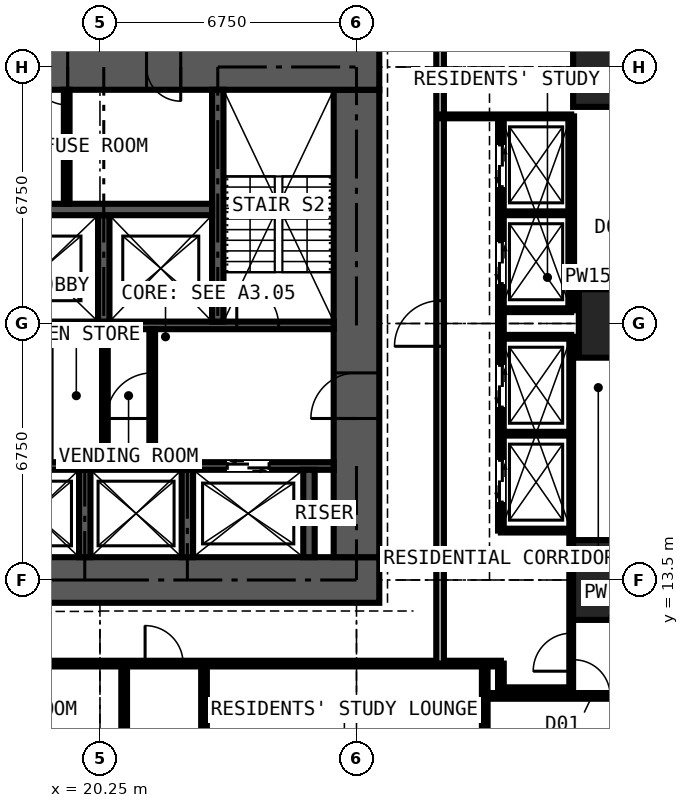
"""IFC4 building model, lengths in metres.
Left out: names, types, materials, properties, quantities, classifications, styles, units other than length and angle.
Written with IfcOpenShell. Run it as: python <this file> out.ifc"""

import sys

from ifc_helpers import new_model, si_unit, direction, frame, frame_2d, origin, origin_2d, place, context, subcontext, project, spatial, rectangle, extrude, element, fill, save


model = new_model("IFC4")
c1 = context("Model", 3, precision=1e-05, world=origin(), true_north=direction((0.0, 1.0)))
c2 = subcontext(c1, "Body", "Model", "MODEL_VIEW")
j1 = project(units=[si_unit("LENGTHUNIT", "METRE"), si_unit("PLANEANGLEUNIT", "RADIAN")], contexts=[c1])
p1 = place(None, origin())
s1 = spatial("IfcSite", under=j1, at=p1, CompositionType="ELEMENT")
p2 = place(p1, origin())
s2 = spatial("IfcBuilding", under=s1, at=p2, CompositionType="ELEMENT")
p3 = place(p2, frame((0.0, 0.0, 72.0)))
s3 = spatial("IfcBuildingStorey", under=s2, at=p3, CompositionType="ELEMENT", Elevation=72.0)
p4 = place(p3, frame((33.75, 13.5, 0.0), z_axis=(0.0, 0.0, 1.0), x_axis=(1.0, 0.0, 0.0)))
e1 = element("IfcColumn", 1, at=p4, inside=s3, PredefinedType="COLUMN", context=c2, shape_type="SweptSolid", body=[
    extrude(rectangle(XDim=2.1, YDim=2.1, at=origin_2d()), origin(), (0.0, 0.0, 1.0), 3.6),
])
p5 = place(p3, frame((33.75, 20.25, 0.0), z_axis=(0.0, 0.0, 1.0), x_axis=(1.0, 0.0, 0.0)))
e2 = element("IfcColumn", 2, at=p5, inside=s3, PredefinedType="COLUMN", context=c2, shape_type="SweptSolid", body=[
    extrude(rectangle(XDim=1.8, YDim=1.8, at=origin_2d()), origin(), (0.0, 0.0, 1.0), 3.6),
])
p6 = place(p3, frame((33.75, 27.0, 0.0), z_axis=(0.0, 0.0, 1.0), x_axis=(1.0, 0.0, 0.0)))
e3 = element("IfcColumn", 3, at=p6, inside=s3, PredefinedType="COLUMN", context=c2, shape_type="SweptSolid", body=[
    extrude(rectangle(XDim=2.1, YDim=2.1, at=origin_2d()), origin(), (0.0, 0.0, 1.0), 3.6),
])
p7 = place(p3, frame((12.9, 13.5, 0.0), z_axis=(0.0, 0.0, 1.0), x_axis=(1.0, 0.0, 0.0)))
e4 = element("IfcWall", 4, at=p7, inside=s3, PredefinedType="SHEAR", context=c2, shape_type="SweptSolid", body=[
    extrude(rectangle(XDim=14.7, YDim=1.2, at=frame_2d((7.35, 0.0))), origin(), (0.0, 0.0, 1.0), 3.6),
])
p8 = place(p3, frame((27.0, 14.1, 0.0), z_axis=(0.0, 0.0, 1.0), x_axis=(0.0, 1.0, 0.0)))
e5 = element("IfcWall", 5, at=p8, inside=s3, PredefinedType="SHEAR", context=c2, shape_type="SweptSolid", body=[
    extrude(rectangle(XDim=12.3, YDim=1.2, at=frame_2d((6.15, 0.0))), origin(), (0.0, 0.0, 1.0), 3.6),
])
p9 = place(p8, frame((3.65, 0.0, 0.0)))
e6 = element("IfcOpeningElement", 6, at=p9, cuts=e5, PredefinedType="OPENING", context=c2, shape_type="SweptSolid", body=[
    extrude(rectangle(XDim=1.2, YDim=2.2, at=frame_2d((0.6, 1.1))), frame((0.0, 0.61, 0.0), z_axis=(0.0, -1.0, 0.0), x_axis=(1.0, 0.0, 0.0)), (0.0, 0.0, 1.0), 1.22),
])
p10 = place(p3, frame((27.6, 27.0, 0.0), z_axis=(0.0, 0.0, 1.0), x_axis=(-1.0, 0.0, 0.0)))
e7 = element("IfcWall", 7, at=p10, inside=s3, PredefinedType="SHEAR", context=c2, shape_type="SweptSolid", body=[
    extrude(rectangle(XDim=14.7, YDim=1.2, at=frame_2d((7.35, 0.0))), origin(), (0.0, 0.0, 1.0), 3.6),
])
p11 = place(p10, frame((5.225, 0.0, 0.0)))
e8 = element("IfcOpeningElement", 8, at=p11, cuts=e7, PredefinedType="OPENING", context=c2, shape_type="SweptSolid", body=[
    extrude(rectangle(XDim=0.9, YDim=2.2, at=frame_2d((0.45, 1.1))), frame((0.0, 0.61, 0.0), z_axis=(0.0, -1.0, 0.0), x_axis=(1.0, 0.0, 0.0)), (0.0, 0.0, 1.0), 1.22),
])
p12 = place(p10, frame((8.2, 0.0, 0.0)))
e9 = element("IfcOpeningElement", 9, at=p12, cuts=e7, PredefinedType="OPENING", context=c2, shape_type="SweptSolid", body=[
    extrude(rectangle(XDim=1.0, YDim=2.2, at=frame_2d((0.5, 1.1))), frame((0.0, 0.61, 0.0), z_axis=(0.0, -1.0, 0.0), x_axis=(1.0, 0.0, 0.0)), (0.0, 0.0, 1.0), 1.22),
])
p13 = place(p3, frame((14.1, 16.5, 0.0), z_axis=(0.0, 0.0, 1.0), x_axis=(1.0, 0.0, 0.0)))
e10 = element("IfcWall", 10, at=p13, inside=s3, PredefinedType="SHEAR", context=c2, shape_type="SweptSolid", body=[
    extrude(rectangle(XDim=12.3, YDim=0.2, at=frame_2d((6.15, 0.0))), origin(), (0.0, 0.0, 1.0), 3.6),
])
p14 = place(p13, frame((0.9, 0.0, 0.0)))
e11 = element("IfcOpeningElement", 11, at=p14, cuts=e10, PredefinedType="OPENING", context=c2, shape_type="SweptSolid", body=[
    extrude(rectangle(XDim=1.1, YDim=2.2, at=frame_2d((0.55, 1.1))), frame((0.0, 0.11, 0.0), z_axis=(0.0, -1.0, 0.0), x_axis=(1.0, 0.0, 0.0)), (0.0, 0.0, 1.0), 0.22),
])
p15 = place(p13, frame((9.5, 0.0, 0.0)))
e12 = element("IfcOpeningElement", 12, at=p15, cuts=e10, PredefinedType="OPENING", context=c2, shape_type="SweptSolid", body=[
    extrude(rectangle(XDim=1.1, YDim=2.2, at=frame_2d((0.55, 1.1))), frame((0.0, 0.11, 0.0), z_axis=(0.0, -1.0, 0.0), x_axis=(1.0, 0.0, 0.0)), (0.0, 0.0, 1.0), 0.22),
])
p16 = place(p3, frame((14.1, 20.2, 0.0), z_axis=(0.0, 0.0, 1.0), x_axis=(1.0, 0.0, 0.0)))
e13 = element("IfcWall", 13, at=p16, inside=s3, PredefinedType="SHEAR", context=c2, shape_type="SweptSolid", body=[
    extrude(rectangle(XDim=12.3, YDim=0.2, at=frame_2d((6.15, 0.0))), origin(), (0.0, 0.0, 1.0), 3.6),
])
p17 = place(p16, frame((0.35, 0.0, 0.0)))
e14 = element("IfcOpeningElement", 14, at=p17, cuts=e13, PredefinedType="OPENING", context=c2, shape_type="SweptSolid", body=[
    extrude(rectangle(XDim=1.1, YDim=2.2, at=frame_2d((0.55, 1.1))), frame((0.0, 0.11, 0.0), z_axis=(0.0, -1.0, 0.0), x_axis=(1.0, 0.0, 0.0)), (0.0, 0.0, 1.0), 0.22),
])
p18 = place(p16, frame((9.75, 0.0, 0.0)))
e15 = element("IfcOpeningElement", 15, at=p18, cuts=e13, PredefinedType="OPENING", context=c2, shape_type="SweptSolid", body=[
    extrude(rectangle(XDim=1.1, YDim=2.2, at=frame_2d((0.55, 1.1))), frame((0.0, 0.11, 0.0), z_axis=(0.0, -1.0, 0.0), x_axis=(1.0, 0.0, 0.0)), (0.0, 0.0, 1.0), 0.22),
])
p19 = place(p3, frame((23.35, 20.3, 0.0), z_axis=(0.0, 0.0, 1.0), x_axis=(0.0, 1.0, 0.0)))
e16 = element("IfcWall", 16, at=p19, inside=s3, PredefinedType="SHEAR", context=c2, shape_type="SweptSolid", body=[
    extrude(rectangle(XDim=6.1, YDim=0.3, at=frame_2d((3.05, 0.0))), origin(), (0.0, 0.0, 1.0), 3.6),
])
p20 = place(p3, frame((20.35, 20.3, 0.0), z_axis=(0.0, 0.0, 1.0), x_axis=(0.0, 1.0, 0.0)))
e17 = element("IfcWall", 17, at=p20, inside=s3, PredefinedType="SHEAR", context=c2, shape_type="SweptSolid", body=[
    extrude(rectangle(XDim=2.8, YDim=0.3, at=frame_2d((1.4, 0.0))), origin(), (0.0, 0.0, 1.0), 3.6),
])
p21 = place(p3, frame((17.3, 23.25, 0.0), z_axis=(0.0, 0.0, 1.0), x_axis=(1.0, 0.0, 0.0)))
e18 = element("IfcWall", 18, at=p21, inside=s3, PredefinedType="SHEAR", context=c2, shape_type="SweptSolid", body=[
    extrude(rectangle(XDim=5.9, YDim=0.3, at=frame_2d((2.95, 0.0))), origin(), (0.0, 0.0, 1.0), 3.6),
])
for number, where, z_axis, x_axis in (
    (19, (19.85, 14.1, 0.0), (0.0, 0.0, 1.0), (0.0, 1.0, 0.0)),
    (20, (22.55, 14.1, 0.0), (0.0, 0.0, 1.0), (0.0, 1.0, 0.0)),
    (21, (25.75, 14.1, 0.0), (0.0, 0.0, 1.0), (0.0, 1.0, 0.0)),
):
    element("IfcWall", number, at=place(p3, frame(where, z_axis=z_axis, x_axis=x_axis)), inside=s3, PredefinedType="SHEAR", context=c2, shape_type="SweptSolid", body=[
        extrude(rectangle(XDim=2.3, YDim=0.3, at=frame_2d((1.15, 0.0))), origin(), (0.0, 0.0, 1.0), 3.6),
    ])
p22 = place(p3, frame((21.625, 16.6, 0.0), z_axis=(0.0, 0.0, 1.0), x_axis=(0.0, 1.0, 0.0)))
e22 = element("IfcWall", 22, at=p22, inside=s3, PredefinedType="PARTITIONING", context=c2, shape_type="SweptSolid", body=[
    extrude(rectangle(XDim=3.5, YDim=0.15, at=frame_2d((1.75, 0.0))), origin(), (0.0, 0.0, 1.0), 3.3),
])
p23 = place(p22, frame((1.15, 0.0, 0.0)))
e23 = element("IfcOpeningElement", 23, at=p23, cuts=e22, PredefinedType="OPENING", context=c2, shape_type="SweptSolid", body=[
    extrude(rectangle(XDim=1.2, YDim=2.2, at=frame_2d((0.6, 1.1))), frame((0.0, 0.085, 0.0), z_axis=(0.0, -1.0, 0.0), x_axis=(1.0, 0.0, 0.0)), (0.0, 0.0, 1.0), 0.17),
])
p24 = place(p3, frame((20.38, 16.6, 0.0), z_axis=(0.0, 0.0, 1.0), x_axis=(0.0, 1.0, 0.0)))
e24 = element("IfcWall", 24, at=p24, inside=s3, PredefinedType="PARTITIONING", context=c2, shape_type="SweptSolid", body=[
    extrude(rectangle(XDim=3.5, YDim=0.15, at=frame_2d((1.75, 0.0))), origin(), (0.0, 0.0, 1.0), 3.3),
])
p25 = place(p3, frame((19.375, 23.4, 0.0), z_axis=(0.0, 0.0, 1.0), x_axis=(0.0, 1.0, 0.0)))
e25 = element("IfcWall", 25, at=p25, inside=s3, PredefinedType="PARTITIONING", context=c2, shape_type="SweptSolid", body=[
    extrude(rectangle(XDim=3.0, YDim=0.15, at=frame_2d((1.5, 0.0))), origin(), (0.0, 0.0, 1.0), 3.3),
])
p26 = place(p3, frame((10.125, 11.3, 0.0), z_axis=(0.0, 0.0, 1.0), x_axis=(1.0, 0.0, 0.0)))
e26 = element("IfcWall", 26, at=p26, inside=s3, PredefinedType="PARTITIONING", context=c2, shape_type="SweptSolid", body=[
    extrude(rectangle(XDim=20.675, YDim=0.15, at=frame_2d((10.337, 0.0))), origin(), (0.0, 0.0, 1.0), 3.3),
])
p27 = place(p26, frame((1.775, 0.0, 0.0)))
e27 = element("IfcOpeningElement", 27, at=p27, cuts=e26, PredefinedType="OPENING", context=c2, shape_type="SweptSolid", body=[
    extrude(rectangle(XDim=1.0, YDim=2.2, at=frame_2d((0.5, 1.1))), frame((0.0, 0.085, 0.0), z_axis=(0.0, -1.0, 0.0), x_axis=(1.0, 0.0, 0.0)), (0.0, 0.0, 1.0), 0.17),
])
p28 = place(p26, frame((11.312, 0.0, 0.0)))
e28 = element("IfcOpeningElement", 28, at=p28, cuts=e26, PredefinedType="OPENING", context=c2, shape_type="SweptSolid", body=[
    extrude(rectangle(XDim=1.0, YDim=2.2, at=frame_2d((0.5, 1.1))), frame((0.0, 0.085, 0.0), z_axis=(0.0, -1.0, 0.0), x_axis=(1.0, 0.0, 0.0)), (0.0, 0.0, 1.0), 0.17),
])
for number, where, z_axis, x_axis in (
    (29, (20.887, 5.65, 0.0), (0.0, 0.0, 1.0), (0.0, 1.0, 0.0)),
    (30, (22.988, 5.65, 0.0), (0.0, 0.0, 1.0), (0.0, 1.0, 0.0)),
):
    element("IfcWall", number, at=place(p3, frame(where, z_axis=z_axis, x_axis=x_axis)), inside=s3, PredefinedType="PARTITIONING", context=c2, shape_type="SweptSolid", body=[
        extrude(rectangle(XDim=5.65, YDim=0.15, at=frame_2d((2.825, 0.0))), origin(), (0.0, 0.0, 1.0), 3.3),
    ])
p29 = place(p3, frame((29.2, 11.3, 0.0), z_axis=(0.0, 0.0, 1.0), x_axis=(0.0, 1.0, 0.0)))
e31 = element("IfcWall", 31, at=p29, inside=s3, PredefinedType="PARTITIONING", context=c2, shape_type="SweptSolid", body=[
    extrude(rectangle(XDim=17.9, YDim=0.2, at=frame_2d((8.95, 0.0))), origin(), (0.0, 0.0, 1.0), 3.3),
])
p30 = place(p29, frame((8.35, 0.0, 0.0)))
e32 = element("IfcOpeningElement", 32, at=p30, cuts=e31, PredefinedType="OPENING", context=c2, shape_type="SweptSolid", body=[
    extrude(rectangle(XDim=1.2, YDim=2.2, at=frame_2d((0.6, 1.1))), frame((0.0, 0.11, 0.0), z_axis=(0.0, -1.0, 0.0), x_axis=(1.0, 0.0, 0.0)), (0.0, 0.0, 1.0), 0.22),
])
p31 = place(p3, frame((29.2, 25.7, 0.0), z_axis=(0.0, 0.0, 1.0), x_axis=(1.0, 0.0, 0.0)))
e33 = element("IfcWall", 33, at=p31, inside=s3, PredefinedType="SHEAR", context=c2, shape_type="SweptSolid", body=[
    extrude(rectangle(XDim=3.45, YDim=0.1, at=frame_2d((1.725, 0.0))), origin(), (0.0, 0.0, 1.0), 3.3),
])
p32 = place(p3, frame((30.375, -0.734, 0.0), z_axis=(0.0, 0.0, 1.0), x_axis=(0.0, 1.0, 0.0)))
e34 = element("IfcWall", 34, at=p32, inside=s3, PredefinedType="PARTITIONING", context=c2, shape_type="SweptSolid", body=[
    extrude(rectangle(XDim=12.034, YDim=0.15, at=frame_2d((6.017, 0.0))), origin(), (0.0, 0.0, 1.0), 3.3),
])
p33 = place(p32, frame((5.134, 0.0, 0.0)))
e35 = element("IfcOpeningElement", 35, at=p33, cuts=e34, PredefinedType="OPENING", context=c2, shape_type="SweptSolid", body=[
    extrude(rectangle(XDim=1.0, YDim=2.2, at=frame_2d((0.5, 1.1))), frame((0.0, 0.085, 0.0), z_axis=(0.0, -1.0, 0.0), x_axis=(1.0, 0.0, 0.0)), (0.0, 0.0, 1.0), 0.17),
])
p34 = place(p3, frame((30.375, 10.45, 0.0), z_axis=(0.0, 0.0, 1.0), x_axis=(1.0, 0.0, 0.0)))
e36 = element("IfcWall", 36, at=p34, inside=s3, PredefinedType="PARTITIONING", context=c2, shape_type="SweptSolid", body=[
    extrude(rectangle(XDim=4.475, YDim=0.15, at=frame_2d((2.238, 0.0))), origin(), (0.0, 0.0, 1.0), 3.3),
])
p35 = place(p34, frame((2.35, 0.0, 0.0)))
e37 = element("IfcOpeningElement", 37, at=p35, cuts=e36, PredefinedType="OPENING", context=c2, shape_type="SweptSolid", body=[
    extrude(rectangle(XDim=0.95, YDim=2.2, at=frame_2d((0.475, 1.1))), frame((0.0, 0.085, 0.0), z_axis=(0.0, -1.0, 0.0), x_axis=(1.0, 0.0, 0.0)), (0.0, 0.0, 1.0), 0.17),
])
p36 = place(p3, frame((30.8, 10.6, 0.0), z_axis=(0.0, 0.0, 1.0), x_axis=(0.0, 1.0, 0.0)))
e38 = element("IfcWall", 38, at=p36, inside=s3, PredefinedType="PARTITIONING", context=c2, shape_type="SweptSolid", body=[
    extrude(rectangle(XDim=0.7, YDim=0.15, at=frame_2d((0.35, 0.0))), origin(), (0.0, 0.0, 1.0), 3.3),
])
p37 = place(p3, frame((30.8, 10.6, 0.0), z_axis=(0.0, 0.0, 1.0), x_axis=(1.0, 0.0, 0.0)))
e39 = element("IfcWall", 39, at=p37, inside=s3, PredefinedType="PARTITIONING", context=c2, shape_type="SweptSolid", body=[
    extrude(rectangle(XDim=1.85, YDim=0.15, at=frame_2d((0.925, 0.0))), origin(), (0.0, 0.0, 1.0), 3.3),
])
p38 = place(p3, frame((30.8, 14.8, 0.0), z_axis=(0.0, 0.0, 1.0), x_axis=(0.0, 1.0, 0.0)))
e40 = element("IfcWall", 40, at=p38, inside=s3, PredefinedType="PARTITIONING", context=c2, shape_type="SweptSolid", body=[
    extrude(rectangle(XDim=10.9, YDim=0.15, at=frame_2d((5.45, 0.0))), origin(), (0.0, 0.0, 1.0), 3.3),
])
p39 = place(p38, frame((0.75, 0.0, 0.0)))
e41 = element("IfcOpeningElement", 41, at=p39, cuts=e40, PredefinedType="OPENING", context=c2, shape_type="SweptSolid", body=[
    extrude(rectangle(XDim=1.1, YDim=2.2, at=frame_2d((0.55, 1.1))), frame((0.0, 0.085, 0.0), z_axis=(0.0, -1.0, 0.0), x_axis=(1.0, 0.0, 0.0)), (0.0, 0.0, 1.0), 0.17),
])
p40 = place(p38, frame((3.25, 0.0, 0.0)))
e42 = element("IfcOpeningElement", 42, at=p40, cuts=e40, PredefinedType="OPENING", context=c2, shape_type="SweptSolid", body=[
    extrude(rectangle(XDim=1.1, YDim=2.2, at=frame_2d((0.55, 1.1))), frame((0.0, 0.085, 0.0), z_axis=(0.0, -1.0, 0.0), x_axis=(1.0, 0.0, 0.0)), (0.0, 0.0, 1.0), 0.17),
])
p41 = place(p38, frame((6.5, 0.0, 0.0)))
e43 = element("IfcOpeningElement", 43, at=p41, cuts=e40, PredefinedType="OPENING", context=c2, shape_type="SweptSolid", body=[
    extrude(rectangle(XDim=1.1, YDim=2.2, at=frame_2d((0.55, 1.1))), frame((0.0, 0.085, 0.0), z_axis=(0.0, -1.0, 0.0), x_axis=(1.0, 0.0, 0.0)), (0.0, 0.0, 1.0), 0.17),
])
p42 = place(p38, frame((9.05, 0.0, 0.0)))
e44 = element("IfcOpeningElement", 44, at=p42, cuts=e40, PredefinedType="OPENING", context=c2, shape_type="SweptSolid", body=[
    extrude(rectangle(XDim=1.1, YDim=2.2, at=frame_2d((0.55, 1.1))), frame((0.0, 0.085, 0.0), z_axis=(0.0, -1.0, 0.0), x_axis=(1.0, 0.0, 0.0)), (0.0, 0.0, 1.0), 0.17),
])
for number, where, z_axis, x_axis in (
    (45, (30.8, 14.8, 0.0), (0.0, 0.0, 1.0), (1.0, 0.0, 0.0)),
    (46, (30.8, 17.35, 0.0), (0.0, 0.0, 1.0), (1.0, 0.0, 0.0)),
    (47, (30.8, 19.9, 0.0), (0.0, 0.0, 1.0), (1.0, 0.0, 0.0)),
    (48, (30.8, 20.6, 0.0), (0.0, 0.0, 1.0), (1.0, 0.0, 0.0)),
    (49, (30.8, 23.15, 0.0), (0.0, 0.0, 1.0), (1.0, 0.0, 0.0)),
):
    element("IfcWall", number, at=place(p3, frame(where, z_axis=z_axis, x_axis=x_axis)), inside=s3, PredefinedType="SHEAR", context=c2, shape_type="SweptSolid", body=[
        extrude(rectangle(XDim=1.85, YDim=0.1, at=frame_2d((0.925, 0.0))), origin(), (0.0, 0.0, 1.0), 3.3),
    ])
p43 = place(p3, frame((32.65, 10.6, 0.0), z_axis=(0.0, 0.0, 1.0), x_axis=(0.0, 1.0, 0.0)))
e50 = element("IfcWall", 50, at=p43, inside=s3, PredefinedType="SHEAR", context=c2, shape_type="SweptSolid", body=[
    extrude(rectangle(XDim=9.3, YDim=0.1, at=frame_2d((4.65, 0.0))), origin(), (0.0, 0.0, 1.0), 3.3),
])
p44 = place(p43, frame((0.5, 0.0, 0.0)))
e51 = element("IfcOpeningElement", 51, at=p44, cuts=e50, PredefinedType="OPENING", context=c2, shape_type="SweptSolid", body=[
    extrude(rectangle(XDim=1.0, YDim=2.2, at=frame_2d((0.5, 1.1))), frame((0.0, 0.06, 0.0), z_axis=(0.0, -1.0, 0.0), x_axis=(1.0, 0.0, 0.0)), (0.0, 0.0, 1.0), 0.12),
])
p45 = place(p3, frame((32.65, 12.55, 0.0), z_axis=(0.0, 0.0, 1.0), x_axis=(1.0, 0.0, 0.0)))
e52 = element("IfcWall", 52, at=p45, inside=s3, PredefinedType="PARTITIONING", context=c2, shape_type="SweptSolid", body=[
    extrude(rectangle(XDim=2.2, YDim=0.15, at=frame_2d((1.1, 0.0))), origin(), (0.0, 0.0, 1.0), 3.3),
])
p46 = place(p3, frame((32.65, 20.6, 0.0), z_axis=(0.0, 0.0, 1.0), x_axis=(0.0, 1.0, 0.0)))
e53 = element("IfcWall", 53, at=p46, inside=s3, PredefinedType="PARTITIONING", context=c2, shape_type="SweptSolid", body=[
    extrude(rectangle(XDim=5.1, YDim=0.15, at=frame_2d((2.55, 0.0))), origin(), (0.0, 0.0, 1.0), 3.3),
])
p47 = place(p15, origin())
e54 = element("IfcDoor", 54, at=p47, inside=s3, OperationType="DOUBLE_DOOR_SLIDING", PredefinedType="DOOR", context=c2, shape_type="SweptSolid", body=[
    extrude(rectangle(XDim=1.1, YDim=2.2, at=frame_2d((0.55, 1.1))), frame((0.0, 0.025, 0.0), z_axis=(0.0, -1.0, 0.0), x_axis=(1.0, 0.0, 0.0)), (0.0, 0.0, 1.0), 0.05),
])
fill(e12, e54)
p48 = place(p9, origin())
e55 = element("IfcDoor", 55, at=p48, inside=s3, OperationType="DOUBLE_DOOR_SINGLE_SWING", PredefinedType="DOOR", context=c2, shape_type="SweptSolid", body=[
    extrude(rectangle(XDim=1.2, YDim=2.2, at=frame_2d((0.6, 1.1))), frame((0.0, 0.025, 0.0), z_axis=(0.0, -1.0, 0.0), x_axis=(1.0, 0.0, 0.0)), (0.0, 0.0, 1.0), 0.05),
])
fill(e6, e55)
p49 = place(p23, origin())
e56 = element("IfcDoor", 56, at=p49, inside=s3, OperationType="DOUBLE_DOOR_SINGLE_SWING", PredefinedType="DOOR", context=c2, shape_type="SweptSolid", body=[
    extrude(rectangle(XDim=1.2, YDim=2.2, at=frame_2d((0.6, 1.1))), frame((0.0, 0.025, 0.0), z_axis=(0.0, -1.0, 0.0), x_axis=(1.0, 0.0, 0.0)), (0.0, 0.0, 1.0), 0.05),
])
fill(e23, e56)
p50 = place(p11, origin())
e57 = element("IfcDoor", 57, at=p50, inside=s3, OperationType="SINGLE_SWING_LEFT", PredefinedType="DOOR", context=c2, shape_type="SweptSolid", body=[
    extrude(rectangle(XDim=0.9, YDim=2.2, at=frame_2d((0.45, 1.1))), frame((0.0, 0.4, 0.0), z_axis=(0.0, -1.0, 0.0), x_axis=(1.0, 0.0, 0.0)), (0.0, 0.0, 1.0), 0.8),
])
fill(e8, e57)
p51 = place(p12, origin())
e58 = element("IfcDoor", 58, at=p51, inside=s3, OperationType="SINGLE_SWING_LEFT", PredefinedType="DOOR", context=c2, shape_type="SweptSolid", body=[
    extrude(rectangle(XDim=1.0, YDim=2.2, at=frame_2d((0.5, 1.1))), frame((0.0, 0.025, 0.0), z_axis=(0.0, -1.0, 0.0), x_axis=(1.0, 0.0, 0.0)), (0.0, 0.0, 1.0), 0.05),
])
fill(e9, e58)
p52 = place(p18, origin())
e59 = element("IfcDoor", 59, at=p52, inside=s3, OperationType="SINGLE_SWING_LEFT", PredefinedType="DOOR", context=c2, shape_type="SweptSolid", body=[
    extrude(rectangle(XDim=1.1, YDim=2.2, at=frame_2d((0.55, 1.1))), frame((0.0, 0.025, 0.0), z_axis=(0.0, -1.0, 0.0), x_axis=(1.0, 0.0, 0.0)), (0.0, 0.0, 1.0), 0.05),
])
fill(e15, e59)
p53 = place(p28, origin())
e60 = element("IfcDoor", 60, at=p53, inside=s3, OperationType="SINGLE_SWING_LEFT", PredefinedType="DOOR", context=c2, shape_type="SweptSolid", body=[
    extrude(rectangle(XDim=1.0, YDim=2.2, at=frame_2d((0.5, 1.1))), frame((0.0, 0.025, 0.0), z_axis=(0.0, -1.0, 0.0), x_axis=(1.0, 0.0, 0.0)), (0.0, 0.0, 1.0), 0.05),
])
fill(e28, e60)
p54 = place(p44, origin())
e61 = element("IfcDoor", 61, at=p54, inside=s3, OperationType="SINGLE_SWING_LEFT", PredefinedType="DOOR", context=c2, shape_type="SweptSolid", body=[
    extrude(rectangle(XDim=1.0, YDim=2.2, at=frame_2d((0.5, 1.1))), frame((0.0, 0.025, 0.0), z_axis=(0.0, -1.0, 0.0), x_axis=(1.0, 0.0, 0.0)), (0.0, 0.0, 1.0), 0.05),
])
fill(e51, e61)
p55 = place(p35, origin())
e62 = element("IfcDoor", 62, at=p55, inside=s3, OperationType="SINGLE_SWING_LEFT", PredefinedType="DOOR", context=c2, shape_type="SweptSolid", body=[
    extrude(rectangle(XDim=0.95, YDim=2.2, at=frame_2d((0.475, 1.1))), frame((0.0, 0.025, 0.0), z_axis=(0.0, -1.0, 0.0), x_axis=(1.0, 0.0, 0.0)), (0.0, 0.0, 1.0), 0.05),
])
fill(e37, e62)
p56 = place(p39, origin())
e63 = element("IfcDoor", 63, at=p56, inside=s3, OperationType="DOUBLE_DOOR_SLIDING", PredefinedType="DOOR", context=c2, shape_type="SweptSolid", body=[
    extrude(rectangle(XDim=1.1, YDim=2.2, at=frame_2d((0.55, 1.1))), frame((0.0, 0.025, 0.0), z_axis=(0.0, -1.0, 0.0), x_axis=(1.0, 0.0, 0.0)), (0.0, 0.0, 1.0), 0.05),
])
fill(e41, e63)
p57 = place(p40, origin())
e64 = element("IfcDoor", 64, at=p57, inside=s3, OperationType="DOUBLE_DOOR_SLIDING", PredefinedType="DOOR", context=c2, shape_type="SweptSolid", body=[
    extrude(rectangle(XDim=1.1, YDim=2.2, at=frame_2d((0.55, 1.1))), frame((0.0, 0.025, 0.0), z_axis=(0.0, -1.0, 0.0), x_axis=(1.0, 0.0, 0.0)), (0.0, 0.0, 1.0), 0.05),
])
fill(e42, e64)
p58 = place(p41, origin())
e65 = element("IfcDoor", 65, at=p58, inside=s3, OperationType="DOUBLE_DOOR_SLIDING", PredefinedType="DOOR", context=c2, shape_type="SweptSolid", body=[
    extrude(rectangle(XDim=1.1, YDim=2.2, at=frame_2d((0.55, 1.1))), frame((0.0, 0.025, 0.0), z_axis=(0.0, -1.0, 0.0), x_axis=(1.0, 0.0, 0.0)), (0.0, 0.0, 1.0), 0.05),
])
fill(e43, e65)
p59 = place(p42, origin())
e66 = element("IfcDoor", 66, at=p59, inside=s3, OperationType="DOUBLE_DOOR_SLIDING", PredefinedType="DOOR", context=c2, shape_type="SweptSolid", body=[
    extrude(rectangle(XDim=1.1, YDim=2.2, at=frame_2d((0.55, 1.1))), frame((0.0, 0.025, 0.0), z_axis=(0.0, -1.0, 0.0), x_axis=(1.0, 0.0, 0.0)), (0.0, 0.0, 1.0), 0.05),
])
fill(e44, e66)
p60 = place(p30, origin())
e67 = element("IfcDoor", 67, at=p60, inside=s3, OperationType="DOUBLE_DOOR_SINGLE_SWING", PredefinedType="DOOR", context=c2, shape_type="SweptSolid", body=[
    extrude(rectangle(XDim=1.2, YDim=2.2, at=frame_2d((0.6, 1.1))), frame((0.0, 0.025, 0.0), z_axis=(0.0, -1.0, 0.0), x_axis=(1.0, 0.0, 0.0)), (0.0, 0.0, 1.0), 0.05),
])
fill(e32, e67)
save(model, sys.argv[1])
